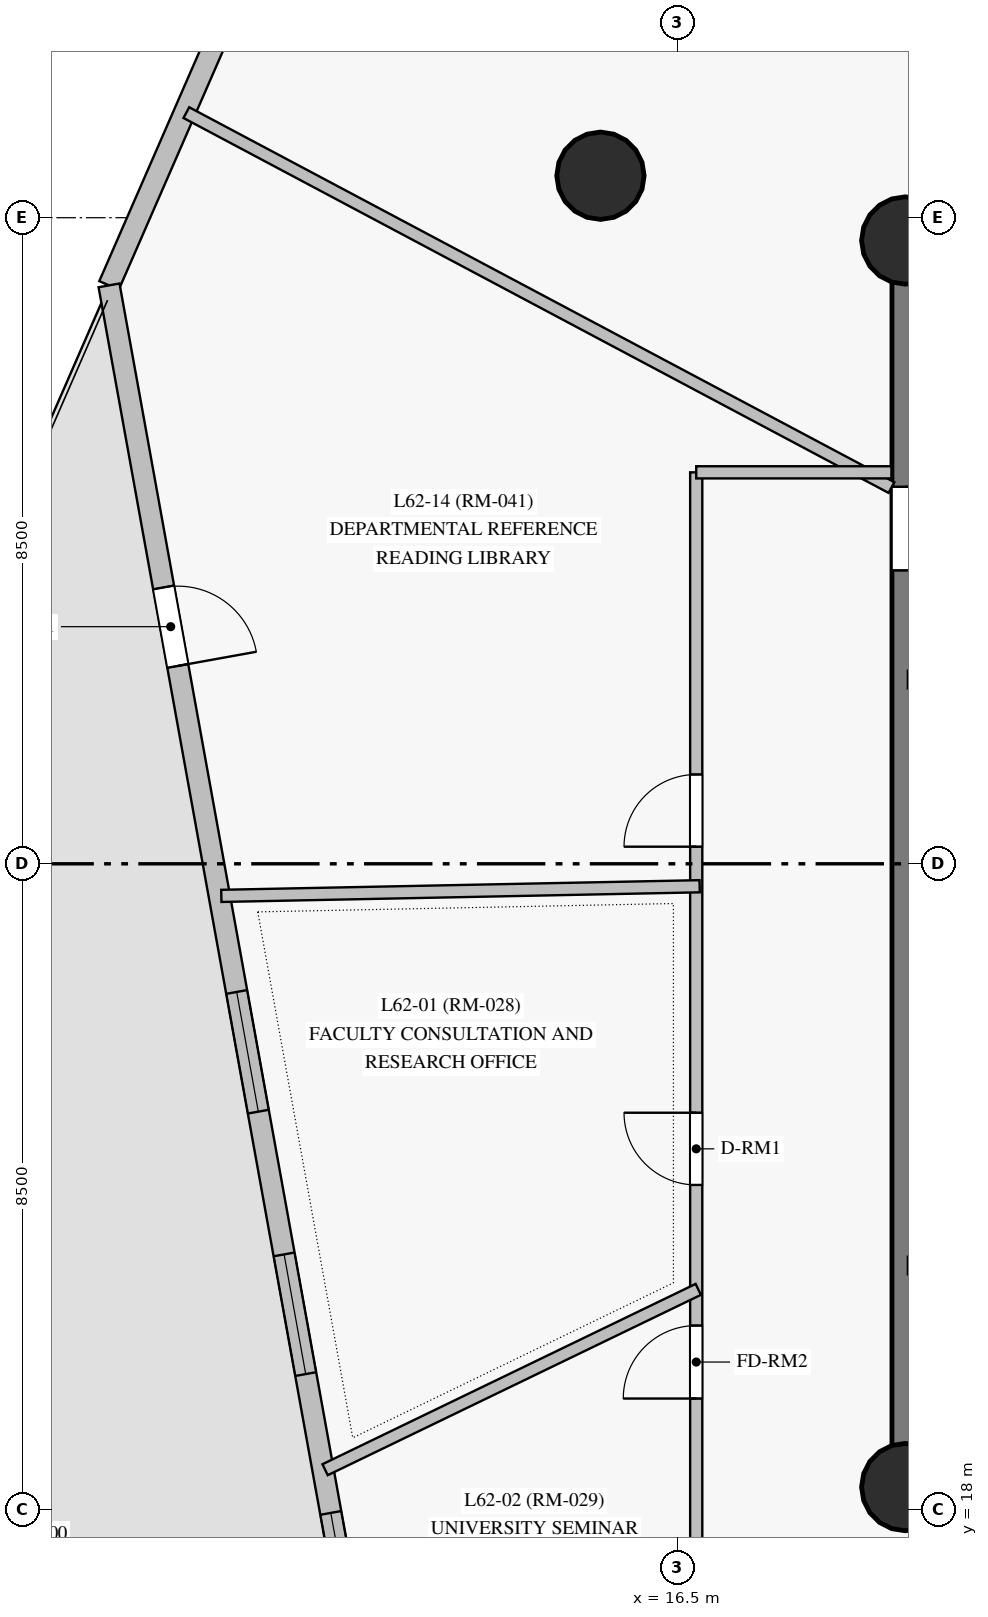
"""IFC4 building model, lengths in metres.
Left out: names, types, materials, properties, quantities, classifications, styles, units other than length and angle.
Written with IfcOpenShell. Run it as: python <this file> out.ifc"""

import sys

from ifc_helpers import new_model, si_unit, direction, frame, frame_2d, origin, origin_with_axes, origin_2d, place, context, subcontext, project, spatial, rectangle, circle, extrude, source, transform, mapped, element, fill, save


model = new_model("IFC4")
c1 = context("Model", 3, precision=1e-05, world=origin(), true_north=direction((0.0, 1.0)))
c2 = subcontext(c1, "Body", "Model", "MODEL_VIEW")
j1 = project(units=[si_unit("LENGTHUNIT", "METRE"), si_unit("PLANEANGLEUNIT", "RADIAN")], contexts=[c1])
p1 = place(None, origin())
s1 = spatial("IfcSite", under=j1, at=p1, CompositionType="ELEMENT")
p2 = place(p1, origin())
s2 = spatial("IfcBuilding", under=s1, at=p2, CompositionType="ELEMENT")
p3 = place(p2, frame((0.0, 0.0, 212.9)))
s3 = spatial("IfcBuildingStorey", under=s2, at=p3, CompositionType="ELEMENT", Elevation=212.9)
p4 = place(p3, frame((19.5, 18.3, 0.0), z_axis=(0.0, 0.0, 1.0), x_axis=(1.0, 0.0, 0.0)))
e1 = element("IfcWall", 1, at=p4, inside=s3, PredefinedType="SHEAR", context=c2, shape_type="SweptSolid", body=[
    extrude(rectangle(XDim=7.05, YDim=0.35, at=frame_2d((3.525, 0.0))), origin(), (0.0, 0.0, 1.0), 3.8),
])
p5 = place(p4, frame((4.2, 0.0, 0.0)))
e2 = element("IfcOpeningElement", 2, at=p5, cuts=e1, PredefinedType="OPENING", context=c2, shape_type="SweptSolid", body=[
    extrude(rectangle(XDim=1.4, YDim=2.2, at=frame_2d((0.7, 1.1))), frame((0.0, 0.185, 0.0), z_axis=(0.0, -1.0, 0.0), x_axis=(1.0, 0.0, 0.0)), (0.0, 0.0, 1.0), 0.37),
])
p6 = place(p3, frame((26.55, 34.7, 0.0), z_axis=(0.0, 0.0, 1.0), x_axis=(-1.0, 0.0, 0.0)))
e3 = element("IfcWall", 3, at=p6, inside=s3, PredefinedType="SHEAR", context=c2, shape_type="SweptSolid", body=[
    extrude(rectangle(XDim=7.05, YDim=0.35, at=frame_2d((3.525, 0.0))), origin(), (0.0, 0.0, 1.0), 3.8),
])
p7 = place(p3, frame((19.5, 34.7, 0.0), z_axis=(0.0, 0.0, 1.0), x_axis=(0.0, -1.0, 0.0)))
e4 = element("IfcWall", 4, at=p7, inside=s3, PredefinedType="SHEAR", context=c2, shape_type="SweptSolid", body=[
    extrude(rectangle(XDim=16.4, YDim=0.35, at=frame_2d((8.2, 0.0))), origin(), (0.0, 0.0, 1.0), 3.8),
])
p8 = place(p7, frame((3.24, 0.0, 0.0)))
e5 = element("IfcOpeningElement", 5, at=p8, cuts=e4, PredefinedType="OPENING", context=c2, shape_type="SweptSolid", body=[
    extrude(rectangle(XDim=1.1, YDim=2.15, at=frame_2d((0.55, 1.075))), frame((0.0, 0.185, 0.0), z_axis=(0.0, -1.0, 0.0), x_axis=(1.0, 0.0, 0.0)), (0.0, 0.0, 1.0), 0.37),
])
m1 = source(origin_with_axes(), c2, "Body", "SweptSolid", [
    extrude(circle(Radius=0.575, at=origin_2d()), origin(), (0.0, 0.0, 1.0), 4.0),
])
for number, where, z_axis, x_axis in (
    (6, (19.5, 18.3, 0.0), (0.0, 0.0, 1.0), (1.0, 0.0, 0.0)),
    (7, (19.5, 34.7, 0.0), (0.0, 0.0, 1.0), (1.0, 0.0, 0.0)),
    (8, (15.49, 35.552, 0.0), (0.0, 0.0, 1.0), (1.0, 0.0, 0.0)),
):
    element("IfcColumn", number, at=place(p3, frame(where, z_axis=z_axis, x_axis=x_axis)), inside=s3, PredefinedType="COLUMN", context=c2, shape_type="MappedRepresentation", body=[
        mapped(m1, transform((0.0, 0.0, 0.0), scale=1.0)),
    ])
p9 = place(p3, frame((11.467, 39.706, 0.0), z_axis=(0.0, 0.0, 1.0), x_axis=(-0.399985981555, -0.916521257015, 0.0)))
e9 = element("IfcWall", 9, at=p9, inside=s3, PredefinedType="SOLIDWALL", context=c2, shape_type="SweptSolid", body=[
    extrude(rectangle(XDim=6.106, YDim=0.28, at=frame_2d((3.053, 0.0))), origin(), (0.0, 0.0, 1.0), 3.8),
])
p10 = place(p9, frame((1.04, 0.0, 0.85)))
e10 = element("IfcOpeningElement", 10, at=p10, cuts=e9, PredefinedType="OPENING", context=c2, shape_type="SweptSolid", body=[
    extrude(rectangle(XDim=1.6, YDim=1.6, at=frame_2d((0.8, 0.8))), frame((0.0, 0.15, 0.0), z_axis=(0.0, -1.0, 0.0), x_axis=(1.0, 0.0, 0.0)), (0.0, 0.0, 1.0), 0.3),
])
p11 = place(p3, frame((9.025, 34.11, 0.0), z_axis=(0.0, 0.0, 1.0), x_axis=(0.177767994096, -0.984072426336, 0.0)))
e11 = element("IfcWall", 11, at=p11, inside=s3, PredefinedType="SOLIDWALL", context=c2, shape_type="SweptSolid", body=[
    extrude(rectangle(XDim=21.901, YDim=0.28, at=frame_2d((10.951, 0.0))), origin(), (0.0, 0.0, 1.0), 3.47),
])
p12 = place(p11, frame((9.446, 0.0, 0.85)))
e12 = element("IfcOpeningElement", 12, at=p12, cuts=e11, PredefinedType="OPENING", context=c2, shape_type="SweptSolid", body=[
    extrude(rectangle(XDim=1.6, YDim=1.6, at=frame_2d((0.8, 0.8))), frame((0.0, 0.15, 0.0), z_axis=(0.0, -1.0, 0.0), x_axis=(1.0, 0.0, 0.0)), (0.0, 0.0, 1.0), 0.3),
])
p13 = place(p11, frame((12.955, 0.0, 0.85)))
e13 = element("IfcOpeningElement", 13, at=p13, cuts=e11, PredefinedType="OPENING", context=c2, shape_type="SweptSolid", body=[
    extrude(rectangle(XDim=1.6, YDim=1.6, at=frame_2d((0.8, 0.8))), frame((0.0, 0.15, 0.0), z_axis=(0.0, -1.0, 0.0), x_axis=(1.0, 0.0, 0.0)), (0.0, 0.0, 1.0), 0.3),
])
p14 = place(p11, frame((16.411, 0.0, 0.85)))
e14 = element("IfcOpeningElement", 14, at=p14, cuts=e11, PredefinedType="OPENING", context=c2, shape_type="SweptSolid", body=[
    extrude(rectangle(XDim=0.95, YDim=1.5, at=frame_2d((0.475, 0.75))), frame((0.0, 0.15, 0.0), z_axis=(0.0, -1.0, 0.0), x_axis=(1.0, 0.0, 0.0)), (0.0, 0.0, 1.0), 0.3),
])
p15 = place(p11, frame((4.038, 0.0, 0.0)))
e15 = element("IfcOpeningElement", 15, at=p15, cuts=e11, PredefinedType="OPENING", context=c2, shape_type="SweptSolid", body=[
    extrude(rectangle(XDim=1.05, YDim=2.12, at=frame_2d((0.525, 1.06))), frame((0.0, 0.15, 0.0), z_axis=(0.0, -1.0, 0.0), x_axis=(1.0, 0.0, 0.0)), (0.0, 0.0, 1.0), 0.3),
])
p16 = place(p3, frame((16.75, 13.85, 0.0), z_axis=(0.0, 0.0, 1.0), x_axis=(0.0, 1.0, 0.0)))
e16 = element("IfcWall", 16, at=p16, inside=s3, PredefinedType="PARTITIONING", context=c2, shape_type="SweptSolid", body=[
    extrude(rectangle(XDim=17.8, YDim=0.16, at=frame_2d((8.9, 0.0))), origin(), (0.0, 0.0, 1.0), 3.4),
])
p17 = place(p16, frame((8.425, 0.0, 0.0)))
e17 = element("IfcOpeningElement", 17, at=p17, cuts=e16, PredefinedType="OPENING", context=c2, shape_type="SweptSolid", body=[
    extrude(rectangle(XDim=0.95, YDim=2.15, at=frame_2d((0.475, 1.075))), frame((0.0, 0.09, 0.0), z_axis=(0.0, -1.0, 0.0), x_axis=(1.0, 0.0, 0.0)), (0.0, 0.0, 1.0), 0.18),
])
p18 = place(p16, frame((5.615, 0.0, 0.0)))
e18 = element("IfcOpeningElement", 18, at=p18, cuts=e16, PredefinedType="OPENING", context=c2, shape_type="SweptSolid", body=[
    extrude(rectangle(XDim=0.96, YDim=2.15, at=frame_2d((0.48, 1.075))), frame((0.0, 0.09, 0.0), z_axis=(0.0, -1.0, 0.0), x_axis=(1.0, 0.0, 0.0)), (0.0, 0.0, 1.0), 0.18),
])
p19 = place(p16, frame((12.875, 0.0, 0.0)))
e19 = element("IfcOpeningElement", 19, at=p19, cuts=e16, PredefinedType="OPENING", context=c2, shape_type="SweptSolid", body=[
    extrude(rectangle(XDim=0.95, YDim=2.15, at=frame_2d((0.475, 1.075))), frame((0.0, 0.09, 0.0), z_axis=(0.0, -1.0, 0.0), x_axis=(1.0, 0.0, 0.0)), (0.0, 0.0, 1.0), 0.18),
])
p20 = place(p3, frame((19.319, 31.45, 0.0), z_axis=(0.0, 0.0, 1.0), x_axis=(-0.882941459701, 0.469483097397, 0.0)))
e20 = element("IfcWall", 20, at=p20, inside=s3, PredefinedType="PARTITIONING", context=c2, shape_type="SweptSolid", body=[
    extrude(rectangle(XDim=10.507, YDim=0.16, at=frame_2d((5.253, 0.0))), origin(), (0.0, 0.0, 1.0), 3.8),
])
p21 = place(p3, frame((10.502, 26.078, 0.0), z_axis=(0.0, 0.0, 1.0), x_axis=(0.999797352316, 0.020130928998, 0.0)))
e21 = element("IfcWall", 21, at=p21, inside=s3, PredefinedType="PARTITIONING", context=c2, shape_type="SweptSolid", body=[
    extrude(rectangle(XDim=6.294, YDim=0.16, at=frame_2d((3.147, 0.0))), origin(), (0.0, 0.0, 1.0), 3.8),
])
p22 = place(p3, frame((16.777, 20.901, 0.0), z_axis=(0.0, 0.0, 1.0), x_axis=(-0.900363570506, -0.435138415801, 0.0)))
e22 = element("IfcWall", 22, at=p22, inside=s3, PredefinedType="PARTITIONING", context=c2, shape_type="SweptSolid", body=[
    extrude(rectangle(XDim=5.453, YDim=0.16, at=frame_2d((2.727, 0.0))), origin(), (0.0, 0.0, 1.0), 3.8),
])
p23 = place(p3, frame((16.75, 31.65, 0.0), z_axis=(0.0, 0.0, 1.0), x_axis=(1.0, 0.0, 0.0)))
e23 = element("IfcWall", 23, at=p23, inside=s3, PredefinedType="PARTITIONING", context=c2, shape_type="SweptSolid", body=[
    extrude(rectangle(XDim=2.568, YDim=0.16, at=frame_2d((1.284, 0.0))), origin(), (0.0, 0.0, 1.0), 3.8),
])
m2 = source(origin_with_axes(), c2, "Body", "SweptSolid", [
    extrude(rectangle(XDim=1.6, YDim=1.6, at=frame_2d((0.8, 0.8))), frame((0.0, 0.03, 0.0), z_axis=(0.0, -1.0, 0.0), x_axis=(1.0, 0.0, 0.0)), (0.0, 0.0, 1.0), 0.06),
])
p24 = place(p12, origin())
e24 = element("IfcWindow", 24, at=p24, inside=s3, PartitioningType="SINGLE_PANEL", PredefinedType="WINDOW", context=c2, shape_type="MappedRepresentation", body=[
    mapped(m2, transform((0.0, 0.0, 0.0), scale=1.0)),
])
fill(e12, e24)
p25 = place(p13, origin())
e25 = element("IfcWindow", 25, at=p25, inside=s3, PartitioningType="SINGLE_PANEL", PredefinedType="WINDOW", context=c2, shape_type="MappedRepresentation", body=[
    mapped(m2, transform((0.0, 0.0, 0.0), scale=1.0)),
])
fill(e13, e25)
m3 = source(origin_with_axes(), c2, "Body", "SweptSolid", [
    extrude(rectangle(XDim=0.95, YDim=1.5, at=frame_2d((0.475, 0.75))), frame((0.0, 0.03, 0.0), z_axis=(0.0, -1.0, 0.0), x_axis=(1.0, 0.0, 0.0)), (0.0, 0.0, 1.0), 0.06),
])
p26 = place(p14, origin())
e26 = element("IfcWindow", 26, at=p26, inside=s3, PartitioningType="SINGLE_PANEL", PredefinedType="WINDOW", context=c2, shape_type="MappedRepresentation", body=[
    mapped(m3, transform((0.0, 0.0, 0.0), scale=1.0)),
])
fill(e14, e26)
m4 = source(origin_with_axes(), c2, "Body", "SweptSolid", [
    extrude(rectangle(XDim=1.05, YDim=2.12, at=frame_2d((0.525, 1.06))), frame((0.0, 0.025, 0.0), z_axis=(0.0, -1.0, 0.0), x_axis=(1.0, 0.0, 0.0)), (0.0, 0.0, 1.0), 0.05),
])
p27 = place(p15, origin())
e27 = element("IfcDoor", 27, at=p27, inside=s3, OperationType="SINGLE_SWING_RIGHT", PredefinedType="DOOR", context=c2, shape_type="MappedRepresentation", body=[
    mapped(m4, transform((0.0, 0.0, 0.0), scale=1.0)),
])
fill(e15, e27)
m5 = source(origin_with_axes(), c2, "Body", "SweptSolid", [
    extrude(rectangle(XDim=1.1, YDim=2.15, at=frame_2d((0.55, 1.075))), frame((0.0, 0.025, 0.0), z_axis=(0.0, -1.0, 0.0), x_axis=(1.0, 0.0, 0.0)), (0.0, 0.0, 1.0), 0.05),
])
p28 = place(p8, origin())
e28 = element("IfcDoor", 28, at=p28, inside=s3, OperationType="SINGLE_SWING_LEFT", PredefinedType="DOOR", context=c2, shape_type="MappedRepresentation", body=[
    mapped(m5, transform((0.0, 0.0, 0.0), scale=1.0)),
])
fill(e5, e28)
m6 = source(origin_with_axes(), c2, "Body", "SweptSolid", [
    extrude(rectangle(XDim=0.95, YDim=2.15, at=frame_2d((0.475, 1.075))), frame((0.0, 0.025, 0.0), z_axis=(0.0, -1.0, 0.0), x_axis=(1.0, 0.0, 0.0)), (0.0, 0.0, 1.0), 0.05),
])
p29 = place(p17, origin())
e29 = element("IfcDoor", 29, at=p29, inside=s3, OperationType="SINGLE_SWING_RIGHT", PredefinedType="DOOR", context=c2, shape_type="MappedRepresentation", body=[
    mapped(m6, transform((0.0, 0.0, 0.0), scale=1.0)),
])
fill(e17, e29)
m7 = source(origin_with_axes(), c2, "Body", "SweptSolid", [
    extrude(rectangle(XDim=0.96, YDim=2.15, at=frame_2d((0.48, 1.075))), frame((0.0, 0.025, 0.0), z_axis=(0.0, -1.0, 0.0), x_axis=(1.0, 0.0, 0.0)), (0.0, 0.0, 1.0), 0.05),
])
p30 = place(p18, origin())
e30 = element("IfcDoor", 30, at=p30, inside=s3, OperationType="SINGLE_SWING_LEFT", PredefinedType="DOOR", context=c2, shape_type="MappedRepresentation", body=[
    mapped(m7, transform((0.0, 0.0, 0.0), scale=1.0)),
])
fill(e18, e30)
p31 = place(p19, origin())
e31 = element("IfcDoor", 31, at=p31, inside=s3, OperationType="SINGLE_SWING_LEFT", PredefinedType="DOOR", context=c2, shape_type="MappedRepresentation", body=[
    mapped(m6, transform((0.0, 0.0, 0.0), scale=1.0)),
])
fill(e19, e31)
save(model, sys.argv[1])
